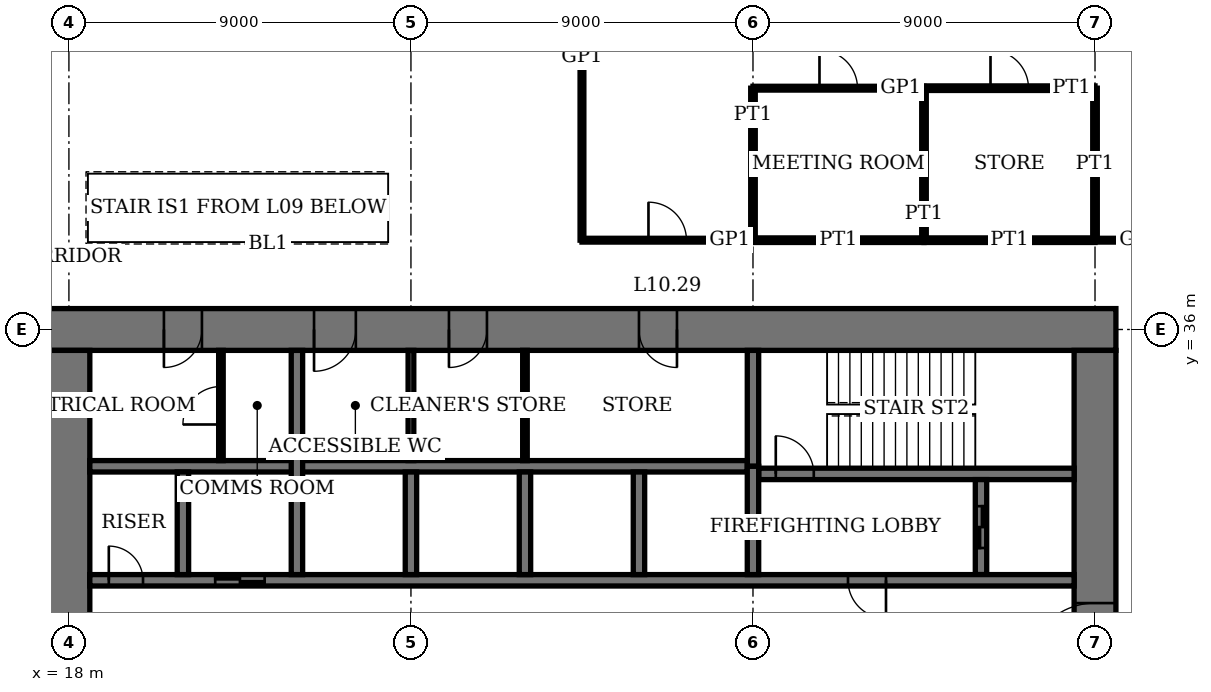
"""IFC4 building model, lengths in metres.
Left out: names, types, materials, properties, quantities, classifications, styles, units other than length and angle.
Written with IfcOpenShell. Run it as: python <this file> out.ifc"""

import sys

from ifc_helpers import new_model, si_unit, direction, frame, frame_2d, origin, place, context, subcontext, project, spatial, rectangle, extrude, element, fill, save


model = new_model("IFC4")
c1 = context("Model", 3, precision=1e-05, world=origin(), true_north=direction((0.0, 1.0)))
c2 = subcontext(c1, "Body", "Model", "MODEL_VIEW")
j1 = project(units=[si_unit("LENGTHUNIT", "METRE"), si_unit("PLANEANGLEUNIT", "RADIAN")], contexts=[c1])
p1 = place(None, origin())
s1 = spatial("IfcSite", under=j1, at=p1, CompositionType="ELEMENT")
p2 = place(p1, origin())
s2 = spatial("IfcBuilding", under=s1, at=p2, CompositionType="ELEMENT")
p3 = place(p2, frame((0.0, 0.0, 43.8)))
s3 = spatial("IfcBuildingStorey", under=s2, at=p3, CompositionType="ELEMENT", Elevation=43.8)
p4 = place(p3, frame((45.55, 36.0, 0.0), z_axis=(0.0, 0.0, 1.0), x_axis=(-1.0, 0.0, 0.0)))
e1 = element("IfcWall", 1, at=p4, inside=s3, PredefinedType="SHEAR", context=c2, shape_type="SweptSolid", body=[
    extrude(rectangle(XDim=28.1, YDim=1.1, at=frame_2d((14.05, 0.0))), origin(), (0.0, 0.0, 1.0), 4.0),
])
p5 = place(p4, frame((11.55, 0.0, 0.0)))
e2 = element("IfcOpeningElement", 2, at=p5, cuts=e1, PredefinedType="OPENING", context=c2, shape_type="SweptSolid", body=[
    extrude(rectangle(XDim=1.0, YDim=2.4, at=frame_2d((0.5, 1.2))), frame((0.0, 0.56, 0.0), z_axis=(0.0, -1.0, 0.0), x_axis=(1.0, 0.0, 0.0)), (0.0, 0.0, 1.0), 1.12),
])
p6 = place(p4, frame((16.55, 0.0, 0.0)))
e3 = element("IfcOpeningElement", 3, at=p6, cuts=e1, PredefinedType="OPENING", context=c2, shape_type="SweptSolid", body=[
    extrude(rectangle(XDim=1.0, YDim=2.4, at=frame_2d((0.5, 1.2))), frame((0.0, 0.56, 0.0), z_axis=(0.0, -1.0, 0.0), x_axis=(1.0, 0.0, 0.0)), (0.0, 0.0, 1.0), 1.12),
])
p7 = place(p4, frame((20.0, 0.0, 0.0)))
e4 = element("IfcOpeningElement", 4, at=p7, cuts=e1, PredefinedType="OPENING", context=c2, shape_type="SweptSolid", body=[
    extrude(rectangle(XDim=1.1, YDim=2.4, at=frame_2d((0.55, 1.2))), frame((0.0, 0.56, 0.0), z_axis=(0.0, -1.0, 0.0), x_axis=(1.0, 0.0, 0.0)), (0.0, 0.0, 1.0), 1.12),
])
p8 = place(p4, frame((24.05, 0.0, 0.0)))
e5 = element("IfcOpeningElement", 5, at=p8, cuts=e1, PredefinedType="OPENING", context=c2, shape_type="SweptSolid", body=[
    extrude(rectangle(XDim=1.0, YDim=2.4, at=frame_2d((0.5, 1.2))), frame((0.0, 0.56, 0.0), z_axis=(0.0, -1.0, 0.0), x_axis=(1.0, 0.0, 0.0)), (0.0, 0.0, 1.0), 1.12),
])
p9 = place(p3, frame((18.0, 35.45, 0.0), z_axis=(0.0, 0.0, 1.0), x_axis=(0.0, -1.0, 0.0)))
e6 = element("IfcWall", 6, at=p9, inside=s3, PredefinedType="SHEAR", context=c2, shape_type="SweptSolid", body=[
    extrude(rectangle(XDim=16.9, YDim=1.1, at=frame_2d((8.45, 0.0))), origin(), (0.0, 0.0, 1.0), 4.0),
])
p10 = place(p9, frame((8.45, 0.0, 0.0)))
e7 = element("IfcOpeningElement", 7, at=p10, cuts=e6, PredefinedType="OPENING", context=c2, shape_type="SweptSolid", body=[
    extrude(rectangle(XDim=1.8, YDim=2.4, at=frame_2d((0.9, 1.2))), frame((0.0, 0.56, 0.0), z_axis=(0.0, -1.0, 0.0), x_axis=(1.0, 0.0, 0.0)), (0.0, 0.0, 1.0), 1.12),
])
p11 = place(p3, frame((45.0, 18.55, 0.0), z_axis=(0.0, 0.0, 1.0), x_axis=(0.0, 1.0, 0.0)))
e8 = element("IfcWall", 8, at=p11, inside=s3, PredefinedType="SHEAR", context=c2, shape_type="SweptSolid", body=[
    extrude(rectangle(XDim=16.9, YDim=1.1, at=frame_2d((8.45, 0.0))), origin(), (0.0, 0.0, 1.0), 4.0),
])
p12 = place(p11, frame((8.45, 0.0, 0.0)))
e9 = element("IfcOpeningElement", 9, at=p12, cuts=e8, PredefinedType="OPENING", context=c2, shape_type="SweptSolid", body=[
    extrude(rectangle(XDim=1.8, YDim=2.4, at=frame_2d((0.9, 1.2))), frame((0.0, 0.56, 0.0), z_axis=(0.0, -1.0, 0.0), x_axis=(1.0, 0.0, 0.0)), (0.0, 0.0, 1.0), 1.12),
])
p13 = place(p3, frame((36.15, 32.2, 0.0), z_axis=(0.0, 0.0, 1.0), x_axis=(1.0, 0.0, 0.0)))
e10 = element("IfcWall", 10, at=p13, inside=s3, PredefinedType="SHEAR", context=c2, shape_type="SweptSolid", body=[
    extrude(rectangle(XDim=8.3, YDim=0.3, at=frame_2d((4.15, 0.0))), origin(), (0.0, 0.0, 1.0), 4.0),
])
p14 = place(p13, frame((0.45, 0.0, 0.0)))
e11 = element("IfcOpeningElement", 11, at=p14, cuts=e10, PredefinedType="OPENING", context=c2, shape_type="SweptSolid", body=[
    extrude(rectangle(XDim=1.0, YDim=2.4, at=frame_2d((0.5, 1.2))), frame((0.0, 0.16, 0.0), z_axis=(0.0, -1.0, 0.0), x_axis=(1.0, 0.0, 0.0)), (0.0, 0.0, 1.0), 0.32),
])
p15 = place(p3, frame((36.0, 32.4, 0.0), z_axis=(0.0, 0.0, 1.0), x_axis=(0.0, 1.0, 0.0)))
e12 = element("IfcWall", 12, at=p15, inside=s3, PredefinedType="SHEAR", context=c2, shape_type="SweptSolid", body=[
    extrude(rectangle(XDim=3.05, YDim=0.3, at=frame_2d((1.525, 0.0))), origin(), (0.0, 0.0, 1.0), 4.0),
])
p16 = place(p3, frame((42.0, 29.55, 0.0), z_axis=(0.0, 0.0, 1.0), x_axis=(0.0, 1.0, 0.0)))
e13 = element("IfcWall", 13, at=p16, inside=s3, PredefinedType="SHEAR", context=c2, shape_type="SweptSolid", body=[
    extrude(rectangle(XDim=2.5, YDim=0.3, at=frame_2d((1.25, 0.0))), origin(), (0.0, 0.0, 1.0), 4.0),
])
p17 = place(p16, frame((0.7, 0.0, 0.0)))
e14 = element("IfcOpeningElement", 14, at=p17, cuts=e13, PredefinedType="OPENING", context=c2, shape_type="SweptSolid", body=[
    extrude(rectangle(XDim=1.1, YDim=2.4, at=frame_2d((0.55, 1.2))), frame((0.0, 0.16, 0.0), z_axis=(0.0, -1.0, 0.0), x_axis=(1.0, 0.0, 0.0)), (0.0, 0.0, 1.0), 0.32),
])
p18 = place(p3, frame((18.55, 29.4, 0.0), z_axis=(0.0, 0.0, 1.0), x_axis=(1.0, 0.0, 0.0)))
e15 = element("IfcWall", 15, at=p18, inside=s3, PredefinedType="SHEAR", context=c2, shape_type="SweptSolid", body=[
    extrude(rectangle(XDim=25.9, YDim=0.3, at=frame_2d((12.95, 0.0))), origin(), (0.0, 0.0, 1.0), 4.0),
])
p19 = place(p18, frame((19.95, 0.0, 0.0)))
e16 = element("IfcOpeningElement", 16, at=p19, cuts=e15, PredefinedType="OPENING", context=c2, shape_type="SweptSolid", body=[
    extrude(rectangle(XDim=1.0, YDim=2.4, at=frame_2d((0.5, 1.2))), frame((0.0, 0.16, 0.0), z_axis=(0.0, -1.0, 0.0), x_axis=(1.0, 0.0, 0.0)), (0.0, 0.0, 1.0), 0.32),
])
p20 = place(p18, frame((0.5, 0.0, 0.0)))
e17 = element("IfcOpeningElement", 17, at=p20, cuts=e15, PredefinedType="OPENING", context=c2, shape_type="SweptSolid", body=[
    extrude(rectangle(XDim=0.9, YDim=2.1, at=frame_2d((0.45, 1.05))), frame((0.0, 0.16, 0.0), z_axis=(0.0, -1.0, 0.0), x_axis=(1.0, 0.0, 0.0)), (0.0, 0.0, 1.0), 0.32),
])
p21 = place(p18, frame((3.3, 0.0, 0.0)))
e18 = element("IfcOpeningElement", 18, at=p21, cuts=e15, PredefinedType="OPENING", context=c2, shape_type="SweptSolid", body=[
    extrude(rectangle(XDim=1.3, YDim=2.4, at=frame_2d((0.65, 1.2))), frame((0.0, 0.16, 0.0), z_axis=(0.0, -1.0, 0.0), x_axis=(1.0, 0.0, 0.0)), (0.0, 0.0, 1.0), 0.32),
])
p22 = place(p3, frame((18.55, 32.4, 0.0), z_axis=(0.0, 0.0, 1.0), x_axis=(1.0, 0.0, 0.0)))
e19 = element("IfcWall", 19, at=p22, inside=s3, PredefinedType="SHEAR", context=c2, shape_type="SweptSolid", body=[
    extrude(rectangle(XDim=17.3, YDim=0.3, at=frame_2d((8.65, 0.0))), origin(), (0.0, 0.0, 1.0), 4.0),
])
for number, where, z_axis, x_axis in (
    (20, (33.0, 29.55, 0.0), (0.0, 0.0, 1.0), (0.0, 1.0, 0.0)),
    (21, (30.0, 29.55, 0.0), (0.0, 0.0, 1.0), (0.0, 1.0, 0.0)),
    (22, (27.0, 29.55, 0.0), (0.0, 0.0, 1.0), (0.0, 1.0, 0.0)),
):
    element("IfcWall", number, at=place(p3, frame(where, z_axis=z_axis, x_axis=x_axis)), inside=s3, PredefinedType="SHEAR", context=c2, shape_type="SweptSolid", body=[
        extrude(rectangle(XDim=2.7, YDim=0.3, at=frame_2d((1.35, 0.0))), origin(), (0.0, 0.0, 1.0), 4.0),
    ])
p23 = place(p3, frame((24.0, 29.55, 0.0), z_axis=(0.0, 0.0, 1.0), x_axis=(0.0, 1.0, 0.0)))
e23 = element("IfcWall", 23, at=p23, inside=s3, PredefinedType="SHEAR", context=c2, shape_type="SweptSolid", body=[
    extrude(rectangle(XDim=5.9, YDim=0.3, at=frame_2d((2.95, 0.0))), origin(), (0.0, 0.0, 1.0), 4.0),
])
p24 = place(p3, frame((21.0, 29.55, 0.0), z_axis=(0.0, 0.0, 1.0), x_axis=(0.0, 1.0, 0.0)))
e24 = element("IfcWall", 24, at=p24, inside=s3, PredefinedType="SHEAR", context=c2, shape_type="SweptSolid", body=[
    extrude(rectangle(XDim=2.7, YDim=0.3, at=frame_2d((1.35, 0.0))), origin(), (0.0, 0.0, 1.0), 4.0),
])
p25 = place(p3, frame((36.0, 29.55, 0.0), z_axis=(0.0, 0.0, 1.0), x_axis=(0.0, 1.0, 0.0)))
e25 = element("IfcWall", 25, at=p25, inside=s3, PredefinedType="SHEAR", context=c2, shape_type="SweptSolid", body=[
    extrude(rectangle(XDim=2.85, YDim=0.3, at=frame_2d((1.425, 0.0))), origin(), (0.0, 0.0, 1.0), 4.0),
])
for number, where, z_axis, x_axis in (
    (26, (36.0, 38.35, 0.0), (0.0, 0.0, 1.0), (1.0, 0.0, 0.0)),
    (27, (40.5, 38.35, 0.0), (0.0, 0.0, 1.0), (1.0, 0.0, 0.0)),
):
    element("IfcWall", number, at=place(p3, frame(where, z_axis=z_axis, x_axis=x_axis)), inside=s3, PredefinedType="PARTITIONING", context=c2, shape_type="SweptSolid", body=[
        extrude(rectangle(XDim=4.5, YDim=0.12, at=frame_2d((2.25, 0.0))), origin(), (0.0, 0.0, 1.0), 3.75),
    ])
p26 = place(p3, frame((31.5, 38.35, 0.0), z_axis=(0.0, 0.0, 1.0), x_axis=(1.0, 0.0, 0.0)))
e28 = element("IfcWall", 28, at=p26, inside=s3, PredefinedType="PARTITIONING", context=c2, shape_type="SweptSolid", body=[
    extrude(rectangle(XDim=4.5, YDim=0.1, at=frame_2d((2.25, 0.0))), origin(), (0.0, 0.0, 1.0), 3.75),
])
p27 = place(p26, frame((1.75, 0.0, 0.0)))
e29 = element("IfcOpeningElement", 29, at=p27, cuts=e28, PredefinedType="OPENING", context=c2, shape_type="SweptSolid", body=[
    extrude(rectangle(XDim=1.0, YDim=2.4, at=frame_2d((0.5, 1.2))), frame((0.0, 0.06, 0.0), z_axis=(0.0, -1.0, 0.0), x_axis=(1.0, 0.0, 0.0)), (0.0, 0.0, 1.0), 0.12),
])
p28 = place(p3, frame((45.0, 38.35, 0.0), z_axis=(0.0, 0.0, 1.0), x_axis=(1.0, 0.0, 0.0)))
e30 = element("IfcWall", 30, at=p28, inside=s3, PredefinedType="PARTITIONING", context=c2, shape_type="SweptSolid", body=[
    extrude(rectangle(XDim=2.35, YDim=0.1, at=frame_2d((1.175, 0.0))), origin(), (0.0, 0.0, 1.0), 3.75),
])
p29 = place(p3, frame((40.5, 42.35, 0.0), z_axis=(0.0, 0.0, 1.0), x_axis=(1.0, 0.0, 0.0)))
e31 = element("IfcWall", 31, at=p29, inside=s3, PredefinedType="PARTITIONING", context=c2, shape_type="SweptSolid", body=[
    extrude(rectangle(XDim=4.5, YDim=0.12, at=frame_2d((2.25, 0.0))), origin(), (0.0, 0.0, 1.0), 3.75),
])
p30 = place(p29, frame((1.75, 0.0, 0.0)))
e32 = element("IfcOpeningElement", 32, at=p30, cuts=e31, PredefinedType="OPENING", context=c2, shape_type="SweptSolid", body=[
    extrude(rectangle(XDim=1.0, YDim=2.4, at=frame_2d((0.5, 1.2))), frame((0.0, 0.07, 0.0), z_axis=(0.0, -1.0, 0.0), x_axis=(1.0, 0.0, 0.0)), (0.0, 0.0, 1.0), 0.14),
])
p31 = place(p3, frame((36.0, 42.35, 0.0), z_axis=(0.0, 0.0, 1.0), x_axis=(1.0, 0.0, 0.0)))
e33 = element("IfcWall", 33, at=p31, inside=s3, PredefinedType="PARTITIONING", context=c2, shape_type="SweptSolid", body=[
    extrude(rectangle(XDim=4.5, YDim=0.1, at=frame_2d((2.25, 0.0))), origin(), (0.0, 0.0, 1.0), 3.75),
])
p32 = place(p31, frame((1.75, 0.0, 0.0)))
e34 = element("IfcOpeningElement", 34, at=p32, cuts=e33, PredefinedType="OPENING", context=c2, shape_type="SweptSolid", body=[
    extrude(rectangle(XDim=1.0, YDim=2.4, at=frame_2d((0.5, 1.2))), frame((0.0, 0.06, 0.0), z_axis=(0.0, -1.0, 0.0), x_axis=(1.0, 0.0, 0.0)), (0.0, 0.0, 1.0), 0.12),
])
p33 = place(p3, frame((31.5, 38.35, 0.0), z_axis=(0.0, 0.0, 1.0), x_axis=(0.0, 1.0, 0.0)))
e35 = element("IfcWall", 35, at=p33, inside=s3, PredefinedType="PARTITIONING", context=c2, shape_type="SweptSolid", body=[
    extrude(rectangle(XDim=10.26, YDim=0.1, at=frame_2d((5.13, 0.0))), origin(), (0.0, 0.0, 1.0), 3.75),
])
p34 = place(p3, frame((36.0, 38.35, 0.0), z_axis=(0.0, 0.0, 1.0), x_axis=(0.0, 1.0, 0.0)))
e36 = element("IfcWall", 36, at=p34, inside=s3, PredefinedType="PARTITIONING", context=c2, shape_type="SweptSolid", body=[
    extrude(rectangle(XDim=4.0, YDim=0.12, at=frame_2d((2.0, 0.0))), origin(), (0.0, 0.0, 1.0), 3.05),
])
p35 = place(p3, frame((40.5, 38.35, 0.0), z_axis=(0.0, 0.0, 1.0), x_axis=(0.0, 1.0, 0.0)))
e37 = element("IfcWall", 37, at=p35, inside=s3, PredefinedType="PARTITIONING", context=c2, shape_type="SweptSolid", body=[
    extrude(rectangle(XDim=4.0, YDim=0.12, at=frame_2d((2.0, 0.0))), origin(), (0.0, 0.0, 1.0), 3.75),
])
p36 = place(p3, frame((45.0, 38.35, 0.0), z_axis=(0.0, 0.0, 1.0), x_axis=(0.0, 1.0, 0.0)))
e38 = element("IfcWall", 38, at=p36, inside=s3, PredefinedType="PARTITIONING", context=c2, shape_type="SweptSolid", body=[
    extrude(rectangle(XDim=4.0, YDim=0.12, at=frame_2d((2.0, 0.0))), origin(), (0.0, 0.0, 1.0), 3.05),
])
p37 = place(p3, frame((30.0, 32.55, 0.0), z_axis=(0.0, 0.0, 1.0), x_axis=(0.0, 1.0, 0.0)))
e39 = element("IfcWall", 39, at=p37, inside=s3, PredefinedType="PARTITIONING", context=c2, shape_type="SweptSolid", body=[
    extrude(rectangle(XDim=2.9, YDim=0.12, at=frame_2d((1.45, 0.0))), origin(), (0.0, 0.0, 1.0), 3.75),
])
p38 = place(p3, frame((27.0, 32.55, 0.0), z_axis=(0.0, 0.0, 1.0), x_axis=(0.0, 1.0, 0.0)))
e40 = element("IfcWall", 40, at=p38, inside=s3, PredefinedType="PARTITIONING", context=c2, shape_type="SweptSolid", body=[
    extrude(rectangle(XDim=2.9, YDim=0.15, at=frame_2d((1.45, 0.0))), origin(), (0.0, 0.0, 1.0), 3.75),
])
p39 = place(p3, frame((22.0, 32.55, 0.0), z_axis=(0.0, 0.0, 1.0), x_axis=(0.0, 1.0, 0.0)))
e41 = element("IfcWall", 41, at=p39, inside=s3, PredefinedType="PARTITIONING", context=c2, shape_type="SweptSolid", body=[
    extrude(rectangle(XDim=2.9, YDim=0.12, at=frame_2d((1.45, 0.0))), origin(), (0.0, 0.0, 1.0), 3.75),
])
p40 = place(p39, frame((0.95, 0.0, 0.0)))
e42 = element("IfcOpeningElement", 42, at=p40, cuts=e41, PredefinedType="OPENING", context=c2, shape_type="SweptSolid", body=[
    extrude(rectangle(XDim=1.0, YDim=2.4, at=frame_2d((0.5, 1.2))), frame((0.0, 0.07, 0.0), z_axis=(0.0, -1.0, 0.0), x_axis=(1.0, 0.0, 0.0)), (0.0, 0.0, 1.0), 0.14),
])
p41 = place(p12, origin())
e43 = element("IfcDoor", 43, at=p41, inside=s3, OperationType="DOUBLE_DOOR_DOUBLE_SWING", PredefinedType="DOOR", context=c2, shape_type="SweptSolid", body=[
    extrude(rectangle(XDim=1.8, YDim=2.4, at=frame_2d((0.9, 1.2))), frame((0.0, 0.03, 0.0), z_axis=(0.0, -1.0, 0.0), x_axis=(1.0, 0.0, 0.0)), (0.0, 0.0, 1.0), 0.06),
    extrude(rectangle(XDim=0.04, YDim=2.4, at=frame_2d((0.02, 1.2))), frame((0.0, 0.55, 0.0), z_axis=(0.0, -1.0, 0.0), x_axis=(1.0, 0.0, 0.0)), (0.0, 0.0, 1.0), 1.1),
    extrude(rectangle(XDim=0.04, YDim=2.4, at=frame_2d((1.78, 1.2))), frame((0.0, 0.55, 0.0), z_axis=(0.0, -1.0, 0.0), x_axis=(1.0, 0.0, 0.0)), (0.0, 0.0, 1.0), 1.1),
    extrude(rectangle(XDim=1.8, YDim=0.04, at=frame_2d((0.9, 2.38))), frame((0.0, 0.55, 0.0), z_axis=(0.0, -1.0, 0.0), x_axis=(1.0, 0.0, 0.0)), (0.0, 0.0, 1.0), 1.1),
])
fill(e9, e43)
p42 = place(p5, origin())
e44 = element("IfcDoor", 44, at=p42, inside=s3, OperationType="SINGLE_SWING_RIGHT", PredefinedType="DOOR", context=c2, shape_type="SweptSolid", body=[
    extrude(rectangle(XDim=1.0, YDim=2.4, at=frame_2d((0.5, 1.2))), frame((0.0, 0.025, 0.0), z_axis=(0.0, -1.0, 0.0), x_axis=(1.0, 0.0, 0.0)), (0.0, 0.0, 1.0), 0.05),
    extrude(rectangle(XDim=0.04, YDim=2.4, at=frame_2d((0.02, 1.2))), frame((0.0, 0.4, 0.0), z_axis=(0.0, -1.0, 0.0), x_axis=(1.0, 0.0, 0.0)), (0.0, 0.0, 1.0), 0.8),
    extrude(rectangle(XDim=0.04, YDim=2.4, at=frame_2d((0.98, 1.2))), frame((0.0, 0.4, 0.0), z_axis=(0.0, -1.0, 0.0), x_axis=(1.0, 0.0, 0.0)), (0.0, 0.0, 1.0), 0.8),
    extrude(rectangle(XDim=1.0, YDim=0.04, at=frame_2d((0.5, 2.38))), frame((0.0, 0.4, 0.0), z_axis=(0.0, -1.0, 0.0), x_axis=(1.0, 0.0, 0.0)), (0.0, 0.0, 1.0), 0.8),
])
fill(e2, e44)
p43 = place(p6, origin())
e45 = element("IfcDoor", 45, at=p43, inside=s3, OperationType="SINGLE_SWING_LEFT", PredefinedType="DOOR", context=c2, shape_type="SweptSolid", body=[
    extrude(rectangle(XDim=1.0, YDim=2.4, at=frame_2d((0.5, 1.2))), frame((0.0, 0.025, 0.0), z_axis=(0.0, -1.0, 0.0), x_axis=(1.0, 0.0, 0.0)), (0.0, 0.0, 1.0), 0.05),
    extrude(rectangle(XDim=0.04, YDim=2.4, at=frame_2d((0.02, 1.2))), frame((0.0, 0.4, 0.0), z_axis=(0.0, -1.0, 0.0), x_axis=(1.0, 0.0, 0.0)), (0.0, 0.0, 1.0), 0.8),
    extrude(rectangle(XDim=0.04, YDim=2.4, at=frame_2d((0.98, 1.2))), frame((0.0, 0.4, 0.0), z_axis=(0.0, -1.0, 0.0), x_axis=(1.0, 0.0, 0.0)), (0.0, 0.0, 1.0), 0.8),
    extrude(rectangle(XDim=1.0, YDim=0.04, at=frame_2d((0.5, 2.38))), frame((0.0, 0.4, 0.0), z_axis=(0.0, -1.0, 0.0), x_axis=(1.0, 0.0, 0.0)), (0.0, 0.0, 1.0), 0.8),
])
fill(e3, e45)
p44 = place(p7, origin())
e46 = element("IfcDoor", 46, at=p44, inside=s3, OperationType="SINGLE_SWING_LEFT", PredefinedType="DOOR", context=c2, shape_type="SweptSolid", body=[
    extrude(rectangle(XDim=1.1, YDim=2.4, at=frame_2d((0.55, 1.2))), frame((0.0, 0.025, 0.0), z_axis=(0.0, -1.0, 0.0), x_axis=(1.0, 0.0, 0.0)), (0.0, 0.0, 1.0), 0.05),
    extrude(rectangle(XDim=0.04, YDim=2.4, at=frame_2d((0.02, 1.2))), frame((0.0, 0.44, 0.0), z_axis=(0.0, -1.0, 0.0), x_axis=(1.0, 0.0, 0.0)), (0.0, 0.0, 1.0), 0.88),
    extrude(rectangle(XDim=0.04, YDim=2.4, at=frame_2d((1.08, 1.2))), frame((0.0, 0.44, 0.0), z_axis=(0.0, -1.0, 0.0), x_axis=(1.0, 0.0, 0.0)), (0.0, 0.0, 1.0), 0.88),
    extrude(rectangle(XDim=1.1, YDim=0.04, at=frame_2d((0.55, 2.38))), frame((0.0, 0.44, 0.0), z_axis=(0.0, -1.0, 0.0), x_axis=(1.0, 0.0, 0.0)), (0.0, 0.0, 1.0), 0.88),
])
fill(e4, e46)
p45 = place(p8, origin())
e47 = element("IfcDoor", 47, at=p45, inside=s3, OperationType="SINGLE_SWING_LEFT", PredefinedType="DOOR", context=c2, shape_type="SweptSolid", body=[
    extrude(rectangle(XDim=1.0, YDim=2.4, at=frame_2d((0.5, 1.2))), frame((0.0, 0.025, 0.0), z_axis=(0.0, -1.0, 0.0), x_axis=(1.0, 0.0, 0.0)), (0.0, 0.0, 1.0), 0.05),
    extrude(rectangle(XDim=0.04, YDim=2.4, at=frame_2d((0.02, 1.2))), frame((0.0, 0.4, 0.0), z_axis=(0.0, -1.0, 0.0), x_axis=(1.0, 0.0, 0.0)), (0.0, 0.0, 1.0), 0.8),
    extrude(rectangle(XDim=0.04, YDim=2.4, at=frame_2d((0.98, 1.2))), frame((0.0, 0.4, 0.0), z_axis=(0.0, -1.0, 0.0), x_axis=(1.0, 0.0, 0.0)), (0.0, 0.0, 1.0), 0.8),
    extrude(rectangle(XDim=1.0, YDim=0.04, at=frame_2d((0.5, 2.38))), frame((0.0, 0.4, 0.0), z_axis=(0.0, -1.0, 0.0), x_axis=(1.0, 0.0, 0.0)), (0.0, 0.0, 1.0), 0.8),
])
fill(e5, e47)
p46 = place(p14, origin())
e48 = element("IfcDoor", 48, at=p46, inside=s3, OperationType="SINGLE_SWING_RIGHT", PredefinedType="DOOR", context=c2, shape_type="SweptSolid", body=[
    extrude(rectangle(XDim=1.0, YDim=2.4, at=frame_2d((0.5, 1.2))), frame((0.0, 0.03, 0.0), z_axis=(0.0, -1.0, 0.0), x_axis=(1.0, 0.0, 0.0)), (0.0, 0.0, 1.0), 0.06),
])
fill(e11, e48)
p47 = place(p19, origin())
e49 = element("IfcDoor", 49, at=p47, inside=s3, OperationType="SINGLE_SWING_RIGHT", PredefinedType="DOOR", context=c2, shape_type="SweptSolid", body=[
    extrude(rectangle(XDim=1.0, YDim=2.4, at=frame_2d((0.5, 1.2))), frame((0.0, 0.03, 0.0), z_axis=(0.0, -1.0, 0.0), x_axis=(1.0, 0.0, 0.0)), (0.0, 0.0, 1.0), 0.06),
])
fill(e16, e49)
p48 = place(p20, origin())
e50 = element("IfcDoor", 50, at=p48, inside=s3, OperationType="SINGLE_SWING_RIGHT", PredefinedType="DOOR", context=c2, shape_type="SweptSolid", body=[
    extrude(rectangle(XDim=0.9, YDim=2.1, at=frame_2d((0.45, 1.05))), frame((0.0, 0.03, 0.0), z_axis=(0.0, -1.0, 0.0), x_axis=(1.0, 0.0, 0.0)), (0.0, 0.0, 1.0), 0.06),
])
fill(e17, e50)
p49 = place(p27, origin())
e51 = element("IfcDoor", 51, at=p49, inside=s3, OperationType="SINGLE_SWING_RIGHT", PredefinedType="DOOR", context=c2, shape_type="SweptSolid", body=[
    extrude(rectangle(XDim=1.0, YDim=2.4, at=frame_2d((0.5, 1.2))), frame((0.0, 0.02, 0.0), z_axis=(0.0, -1.0, 0.0), x_axis=(1.0, 0.0, 0.0)), (0.0, 0.0, 1.0), 0.04),
])
fill(e29, e51)
p50 = place(p30, origin())
e52 = element("IfcDoor", 52, at=p50, inside=s3, OperationType="SINGLE_SWING_RIGHT", PredefinedType="DOOR", context=c2, shape_type="SweptSolid", body=[
    extrude(rectangle(XDim=1.0, YDim=2.4, at=frame_2d((0.5, 1.2))), frame((0.0, 0.025, 0.0), z_axis=(0.0, -1.0, 0.0), x_axis=(1.0, 0.0, 0.0)), (0.0, 0.0, 1.0), 0.05),
])
fill(e32, e52)
p51 = place(p32, origin())
e53 = element("IfcDoor", 53, at=p51, inside=s3, OperationType="SINGLE_SWING_RIGHT", PredefinedType="DOOR", context=c2, shape_type="SweptSolid", body=[
    extrude(rectangle(XDim=1.0, YDim=2.4, at=frame_2d((0.5, 1.2))), frame((0.0, 0.02, 0.0), z_axis=(0.0, -1.0, 0.0), x_axis=(1.0, 0.0, 0.0)), (0.0, 0.0, 1.0), 0.04),
])
fill(e34, e53)
p52 = place(p40, origin())
e54 = element("IfcDoor", 54, at=p52, inside=s3, OperationType="SINGLE_SWING_RIGHT", PredefinedType="DOOR", context=c2, shape_type="SweptSolid", body=[
    extrude(rectangle(XDim=1.0, YDim=2.4, at=frame_2d((0.5, 1.2))), frame((0.0, 0.03, 0.0), z_axis=(0.0, -1.0, 0.0), x_axis=(1.0, 0.0, 0.0)), (0.0, 0.0, 1.0), 0.06),
])
fill(e42, e54)
p53 = place(p21, origin())
e55 = element("IfcDoor", 55, at=p53, inside=s3, OperationType="DOUBLE_DOOR_SLIDING", PredefinedType="DOOR", context=c2, shape_type="SweptSolid", body=[
    extrude(rectangle(XDim=1.3, YDim=2.4, at=frame_2d((0.65, 1.2))), frame((0.0, 0.02, 0.0), z_axis=(0.0, -1.0, 0.0), x_axis=(1.0, 0.0, 0.0)), (0.0, 0.0, 1.0), 0.04),
])
fill(e18, e55)
p54 = place(p17, origin())
e56 = element("IfcDoor", 56, at=p54, inside=s3, OperationType="DOUBLE_DOOR_SLIDING", PredefinedType="DOOR", context=c2, shape_type="SweptSolid", body=[
    extrude(rectangle(XDim=1.1, YDim=2.4, at=frame_2d((0.55, 1.2))), frame((0.0, 0.03, 0.0), z_axis=(0.0, -1.0, 0.0), x_axis=(1.0, 0.0, 0.0)), (0.0, 0.0, 1.0), 0.06),
])
fill(e14, e56)
save(model, sys.argv[1])
